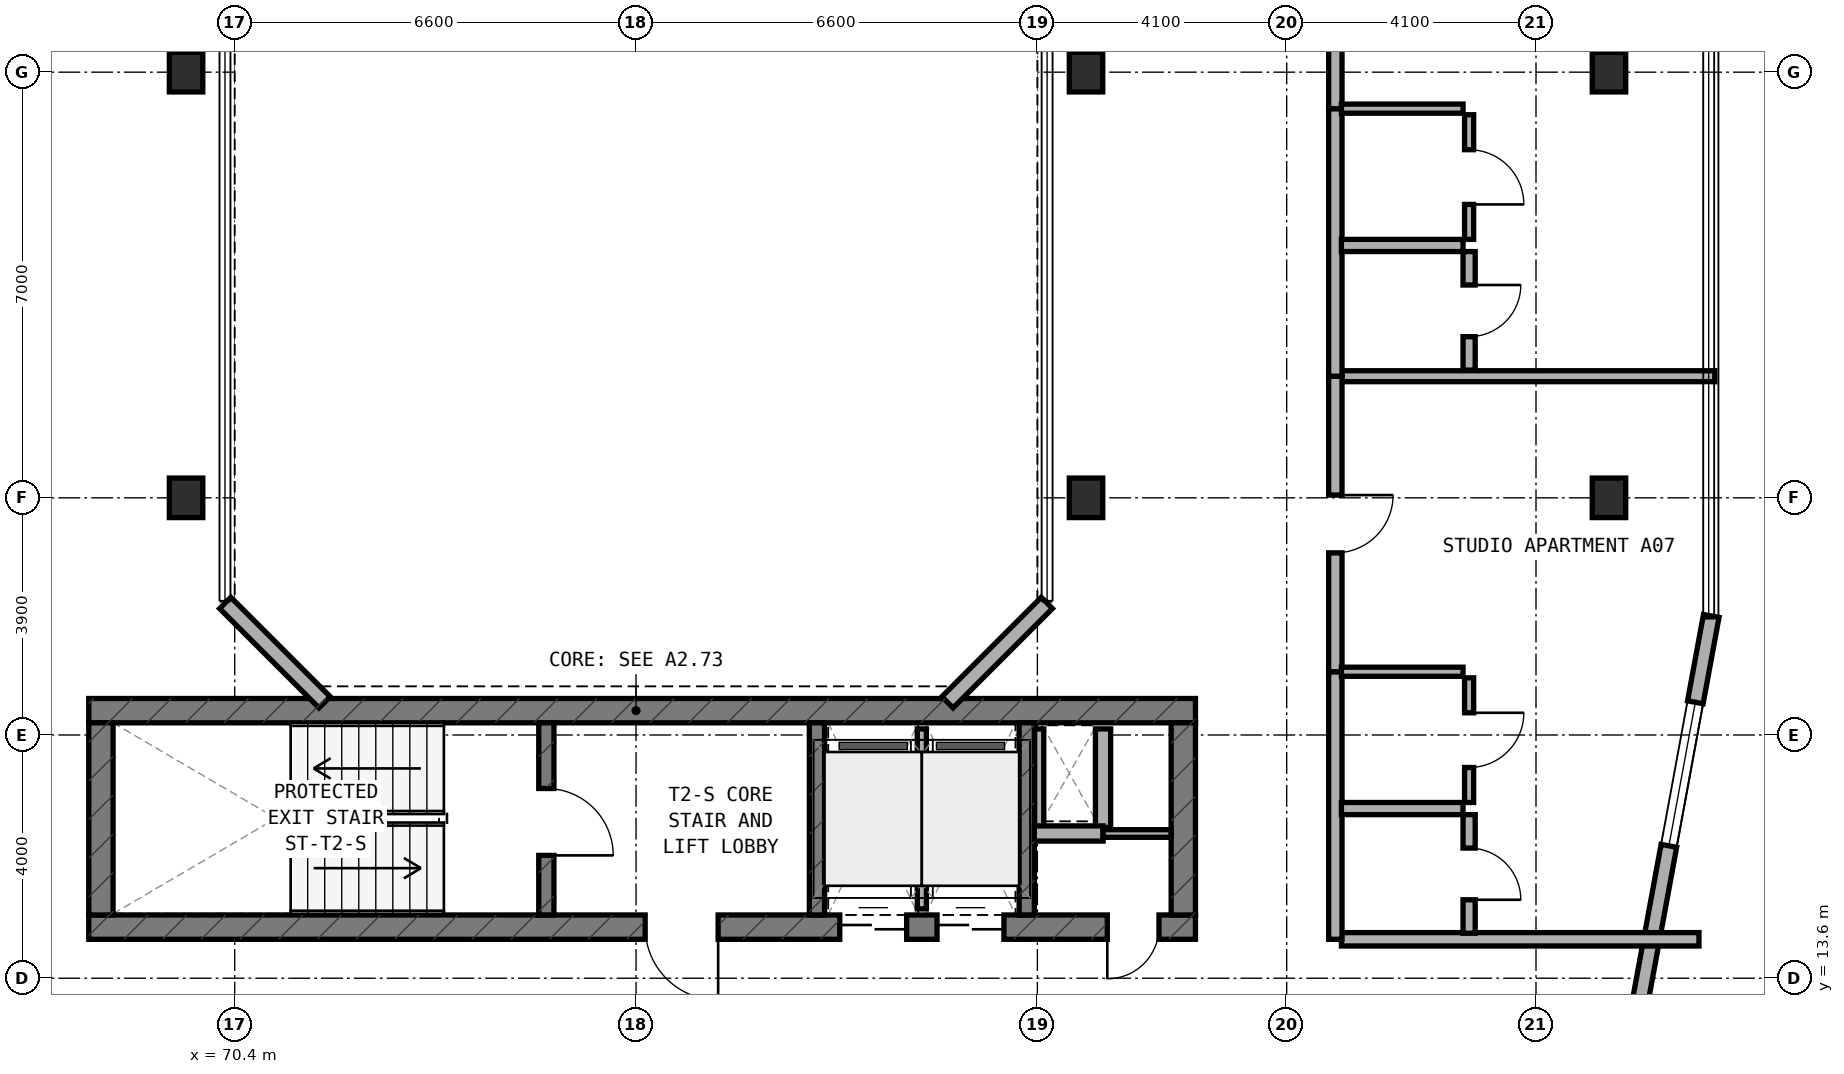
"""IFC4 building model, lengths in metres.
Left out: names, types, materials, properties, quantities, classifications, styles, units other than length and angle.
Written with IfcOpenShell. Run it as: python <this file> out.ifc"""

import sys

from ifc_helpers import new_model, si_unit, direction, frame, frame_2d, origin, origin_2d, place, context, subcontext, project, spatial, rectangle, extrude, element, fill, save


model = new_model("IFC4")
c1 = context("Model", 3, precision=1e-05, world=origin(), true_north=direction((0.0, 1.0)))
c2 = subcontext(c1, "Body", "Model", "MODEL_VIEW")
j1 = project(units=[si_unit("LENGTHUNIT", "METRE"), si_unit("PLANEANGLEUNIT", "RADIAN")], contexts=[c1])
p1 = place(None, origin())
s1 = spatial("IfcSite", under=j1, at=p1, CompositionType="ELEMENT")
p2 = place(p1, origin())
s2 = spatial("IfcBuilding", under=s1, at=p2, CompositionType="ELEMENT")
p3 = place(p2, frame((0.0, 0.0, 116.0)))
s3 = spatial("IfcBuildingStorey", under=s2, at=p3, CompositionType="ELEMENT", Elevation=116.0)
p4 = place(p3, frame((68.0, 14.44, 0.0), z_axis=(0.0, 0.0, 1.0), x_axis=(1.0, 0.0, 0.0)))
e1 = element("IfcWall", 1, at=p4, inside=s3, PredefinedType="SHEAR", context=c2, shape_type="SweptSolid", body=[
    extrude(rectangle(XDim=18.2, YDim=0.4, at=frame_2d((9.1, 0.0))), origin(), (0.0, 0.0, 1.0), 3.5),
])
p5 = place(p4, frame((9.15, 0.0, 0.0)))
e2 = element("IfcOpeningElement", 2, at=p5, cuts=e1, PredefinedType="OPENING", context=c2, shape_type="SweptSolid", body=[
    extrude(rectangle(XDim=1.2, YDim=2.15, at=frame_2d((0.6, 1.075))), frame((0.0, 0.21, 0.0), z_axis=(0.0, -1.0, 0.0), x_axis=(1.0, 0.0, 0.0)), (0.0, 0.0, 1.0), 0.42),
])
p6 = place(p4, frame((16.75, 0.0, 0.0)))
e3 = element("IfcOpeningElement", 3, at=p6, cuts=e1, PredefinedType="OPENING", context=c2, shape_type="SweptSolid", body=[
    extrude(rectangle(XDim=0.85, YDim=2.1, at=frame_2d((0.425, 1.05))), frame((0.0, 0.21, 0.0), z_axis=(0.0, -1.0, 0.0), x_axis=(1.0, 0.0, 0.0)), (0.0, 0.0, 1.0), 0.42),
])
p7 = place(p4, frame((12.35, 0.0, 0.0)))
e4 = element("IfcOpeningElement", 4, at=p7, cuts=e1, PredefinedType="OPENING", context=c2, shape_type="SweptSolid", body=[
    extrude(rectangle(XDim=1.1, YDim=2.15, at=frame_2d((0.55, 1.075))), frame((0.0, 0.21, 0.0), z_axis=(0.0, -1.0, 0.0), x_axis=(1.0, 0.0, 0.0)), (0.0, 0.0, 1.0), 0.42),
])
p8 = place(p4, frame((13.95, 0.0, 0.0)))
e5 = element("IfcOpeningElement", 5, at=p8, cuts=e1, PredefinedType="OPENING", context=c2, shape_type="SweptSolid", body=[
    extrude(rectangle(XDim=1.1, YDim=2.15, at=frame_2d((0.55, 1.075))), frame((0.0, 0.21, 0.0), z_axis=(0.0, -1.0, 0.0), x_axis=(1.0, 0.0, 0.0)), (0.0, 0.0, 1.0), 0.42),
])
p9 = place(p3, frame((68.0, 18.0, 0.0), z_axis=(0.0, 0.0, 1.0), x_axis=(1.0, 0.0, 0.0)))
e6 = element("IfcWall", 6, at=p9, inside=s3, PredefinedType="SHEAR", context=c2, shape_type="SweptSolid", body=[
    extrude(rectangle(XDim=18.2, YDim=0.4, at=frame_2d((9.1, 0.0))), origin(), (0.0, 0.0, 1.0), 3.5),
])
for number, where, z_axis, x_axis in (
    (7, (68.2, 14.64, 0.0), (0.0, 0.0, 1.0), (0.0, 1.0, 0.0)),
    (8, (86.0, 14.64, 0.0), (0.0, 0.0, 1.0), (0.0, 1.0, 0.0)),
):
    element("IfcWall", number, at=place(p3, frame(where, z_axis=z_axis, x_axis=x_axis)), inside=s3, PredefinedType="SHEAR", context=c2, shape_type="SweptSolid", body=[
        extrude(rectangle(XDim=3.16, YDim=0.4, at=frame_2d((1.58, 0.0))), origin(), (0.0, 0.0, 1.0), 3.5),
    ])
p10 = place(p3, frame((75.525, 14.64, 0.0), z_axis=(0.0, 0.0, 1.0), x_axis=(0.0, 1.0, 0.0)))
e9 = element("IfcWall", 9, at=p10, inside=s3, PredefinedType="STANDARD", context=c2, shape_type="SweptSolid", body=[
    extrude(rectangle(XDim=3.16, YDim=0.25, at=frame_2d((1.58, 0.0))), origin(), (0.0, 0.0, 1.0), 3.18),
])
p11 = place(p10, frame((0.98, 0.0, 0.0)))
e10 = element("IfcOpeningElement", 10, at=p11, cuts=e9, PredefinedType="OPENING", context=c2, shape_type="SweptSolid", body=[
    extrude(rectangle(XDim=1.1, YDim=2.15, at=frame_2d((0.55, 1.075))), frame((0.0, 0.135, 0.0), z_axis=(0.0, -1.0, 0.0), x_axis=(1.0, 0.0, 0.0)), (0.0, 0.0, 1.0), 0.27),
])
for number, where, z_axis, x_axis in (
    (11, (79.975, 14.64, 0.0), (0.0, 0.0, 1.0), (0.0, 1.0, 0.0)),
    (12, (83.425, 14.64, 0.0), (0.0, 0.0, 1.0), (0.0, 1.0, 0.0)),
):
    element("IfcWall", number, at=place(p3, frame(where, z_axis=z_axis, x_axis=x_axis)), inside=s3, PredefinedType="STANDARD", context=c2, shape_type="SweptSolid", body=[
        extrude(rectangle(XDim=3.16, YDim=0.25, at=frame_2d((1.58, 0.0))), origin(), (0.0, 0.0, 1.0), 3.18),
    ])
for number, where, z_axis, x_axis in (
    (13, (93.0, 21.5, 0.0), (0.0, 0.0, 1.0), (1.0, 0.0, 0.0)),
    (14, (93.0, 28.5, 0.0), (0.0, 0.0, 1.0), (1.0, 0.0, 0.0)),
    (15, (69.6, 21.5, 0.0), (0.0, 0.0, 1.0), (1.0, 0.0, 0.0)),
    (16, (69.6, 28.5, 0.0), (0.0, 0.0, 1.0), (1.0, 0.0, 0.0)),
    (17, (84.4, 21.5, 0.0), (0.0, 0.0, 1.0), (1.0, 0.0, 0.0)),
    (18, (84.4, 28.5, 0.0), (0.0, 0.0, 1.0), (1.0, 0.0, 0.0)),
):
    element("IfcColumn", number, at=place(p3, frame(where, z_axis=z_axis, x_axis=x_axis)), inside=s3, PredefinedType="COLUMN", context=c2, shape_type="SweptSolid", body=[
        extrude(rectangle(XDim=0.55, YDim=0.65, at=origin_2d()), origin(), (0.0, 0.0, 1.0), 3.5),
    ])
p12 = place(p3, frame((93.071, 10.816, 0.0), z_axis=(0.0, 0.0, 1.0), x_axis=(0.181209963057, 0.983444431215, 0.0)))
e19 = element("IfcWall", 19, at=p12, inside=s3, PredefinedType="STANDARD", context=c2, shape_type="SweptSolid", body=[
    extrude(rectangle(XDim=8.889, YDim=0.26, at=frame_2d((4.445, 0.0))), origin(), (0.0, 0.0, 1.0), 3.18),
])
p13 = place(p12, frame((5.045, 0.0, 0.8)))
e20 = element("IfcOpeningElement", 20, at=p13, cuts=e19, PredefinedType="OPENING", context=c2, shape_type="SweptSolid", body=[
    extrude(rectangle(XDim=2.4, YDim=1.6, at=frame_2d((1.2, 0.8))), frame((0.0, 0.14, 0.0), z_axis=(0.0, -1.0, 0.0), x_axis=(1.0, 0.0, 0.0)), (0.0, 0.0, 1.0), 0.28),
])
for number, where, z_axis, x_axis in (
    (21, (82.122, 18.138, 0.0), (0.0, 0.0, 1.0), (0.707, 0.707, 0.0)),
    (22, (70.244, 19.772, 0.0), (0.0, 0.0, 1.0), (0.707, -0.707, 0.0)),
):
    element("IfcWall", number, at=place(p3, frame(where, z_axis=z_axis, x_axis=x_axis)), inside=s3, PredefinedType="STANDARD", context=c2, shape_type="SweptSolid", body=[
        extrude(rectangle(XDim=2.311, YDim=0.26, at=frame_2d((1.155, 0.0))), origin(), (0.0, 0.0, 1.0), 3.18),
    ])
p14 = place(p3, frame((83.63, 16.08, 0.0), z_axis=(0.0, 0.0, 1.0), x_axis=(0.0, 1.0, 0.0)))
e23 = element("IfcWall", 23, at=p14, inside=s3, PredefinedType="PARTITIONING", context=c2, shape_type="SweptSolid", body=[
    extrude(rectangle(XDim=1.62, YDim=0.15, at=frame_2d((0.81, 0.0))), origin(), (0.0, 0.0, 1.0), 2.755),
])
p15 = place(p3, frame((84.68, 16.08, 0.0), z_axis=(0.0, 0.0, 1.0), x_axis=(0.0, 1.0, 0.0)))
e24 = element("IfcWall", 24, at=p15, inside=s3, PredefinedType="SOLIDWALL", context=c2, shape_type="SweptSolid", body=[
    extrude(rectangle(XDim=1.62, YDim=0.25, at=frame_2d((0.81, 0.0))), origin(), (0.0, 0.0, 1.0), 3.18),
])
p16 = place(p3, frame((83.55, 15.98, 0.0), z_axis=(0.0, 0.0, 1.0), x_axis=(1.0, 0.0, 0.0)))
e25 = element("IfcWall", 25, at=p16, inside=s3, PredefinedType="SOLIDWALL", context=c2, shape_type="SweptSolid", body=[
    extrude(rectangle(XDim=1.13, YDim=0.25, at=frame_2d((0.565, 0.0))), origin(), (0.0, 0.0, 1.0), 3.18),
])
p17 = place(p3, frame((84.68, 15.98, 0.0), z_axis=(0.0, 0.0, 1.0), x_axis=(1.0, 0.0, 0.0)))
e26 = element("IfcWall", 26, at=p17, inside=s3, PredefinedType="PARTITIONING", context=c2, shape_type="SweptSolid", body=[
    extrude(rectangle(XDim=1.12, YDim=0.125, at=frame_2d((0.56, 0.0))), origin(), (0.0, 0.0, 1.0), 3.18),
])
p18 = place(p3, frame((81.7, 14.74, 0.0), z_axis=(0.0, 0.0, 1.0), x_axis=(0.0, 1.0, 0.0)))
e27 = element("IfcWall", 27, at=p18, inside=s3, PredefinedType="PARTITIONING", context=c2, shape_type="SweptSolid", body=[
    extrude(rectangle(XDim=2.96, YDim=0.15, at=frame_2d((1.48, 0.0))), origin(), (0.0, 0.0, 1.0), 3.18),
])
p19 = place(p3, frame((88.6, 14.24, 0.0), z_axis=(0.0, 0.0, 1.0), x_axis=(1.0, 0.0, 0.0)))
e28 = element("IfcWall", 28, at=p19, inside=s3, PredefinedType="SOLIDWALL", context=c2, shape_type="SweptSolid", body=[
    extrude(rectangle(XDim=5.88, YDim=0.22, at=frame_2d((2.94, 0.0))), origin(), (0.0, 0.0, 1.0), 2.875),
])
p20 = place(p3, frame((88.5, 23.5, 0.0), z_axis=(0.0, 0.0, 1.0), x_axis=(1.0, 0.0, 0.0)))
e29 = element("IfcWall", 29, at=p20, inside=s3, PredefinedType="SOLIDWALL", context=c2, shape_type="SweptSolid", body=[
    extrude(rectangle(XDim=6.24, YDim=0.18, at=frame_2d((3.12, 0.0))), origin(), (0.0, 0.0, 1.0), 2.875),
])
p21 = place(p3, frame((88.5, 14.24, 0.0), z_axis=(0.0, 0.0, 1.0), x_axis=(0.0, 1.0, 0.0)))
e30 = element("IfcWall", 30, at=p21, inside=s3, PredefinedType="SOLIDWALL", context=c2, shape_type="SweptSolid", body=[
    extrude(rectangle(XDim=4.4, YDim=0.22, at=frame_2d((2.2, 0.0))), origin(), (0.0, 0.0, 1.0), 3.18),
])
p22 = place(p3, frame((88.5, 18.64, 0.0), z_axis=(0.0, 0.0, 1.0), x_axis=(0.0, 1.0, 0.0)))
e31 = element("IfcWall", 31, at=p22, inside=s3, PredefinedType="SOLIDWALL", context=c2, shape_type="SweptSolid", body=[
    extrude(rectangle(XDim=4.86, YDim=0.22, at=frame_2d((2.43, 0.0))), origin(), (0.0, 0.0, 1.0), 2.755),
])
p23 = place(p22, frame((1.955, 0.0, 0.0)))
e32 = element("IfcOpeningElement", 32, at=p23, cuts=e31, PredefinedType="OPENING", context=c2, shape_type="SweptSolid", body=[
    extrude(rectangle(XDim=0.95, YDim=2.1, at=frame_2d((0.475, 1.05))), frame((0.0, 0.12, 0.0), z_axis=(0.0, -1.0, 0.0), x_axis=(1.0, 0.0, 0.0)), (0.0, 0.0, 1.0), 0.24),
])
p24 = place(p3, frame((88.6, 16.39, 0.0), z_axis=(0.0, 0.0, 1.0), x_axis=(1.0, 0.0, 0.0)))
e33 = element("IfcWall", 33, at=p24, inside=s3, PredefinedType="PLUMBINGWALL", context=c2, shape_type="SweptSolid", body=[
    extrude(rectangle(XDim=2.0, YDim=0.2, at=frame_2d((1.0, 0.0))), origin(), (0.0, 0.0, 1.0), 3.18),
])
p25 = place(p3, frame((88.6, 18.64, 0.0), z_axis=(0.0, 0.0, 1.0), x_axis=(1.0, 0.0, 0.0)))
e34 = element("IfcWall", 34, at=p25, inside=s3, PredefinedType="PARTITIONING", context=c2, shape_type="SweptSolid", body=[
    extrude(rectangle(XDim=2.0, YDim=0.15, at=frame_2d((1.0, 0.0))), origin(), (0.0, 0.0, 1.0), 3.18),
])
p26 = place(p3, frame((90.7, 14.34, 0.0), z_axis=(0.0, 0.0, 1.0), x_axis=(0.0, 1.0, 0.0)))
e35 = element("IfcWall", 35, at=p26, inside=s3, PredefinedType="PLUMBINGWALL", context=c2, shape_type="SweptSolid", body=[
    extrude(rectangle(XDim=1.95, YDim=0.2, at=frame_2d((0.975, 0.0))), origin(), (0.0, 0.0, 1.0), 3.18),
])
p27 = place(p26, frame((0.55, 0.0, 0.0)))
e36 = element("IfcOpeningElement", 36, at=p27, cuts=e35, PredefinedType="OPENING", context=c2, shape_type="SweptSolid", body=[
    extrude(rectangle(XDim=0.85, YDim=2.1, at=frame_2d((0.425, 1.05))), frame((0.0, 0.11, 0.0), z_axis=(0.0, -1.0, 0.0), x_axis=(1.0, 0.0, 0.0)), (0.0, 0.0, 1.0), 0.22),
])
p28 = place(p3, frame((90.7, 16.49, 0.0), z_axis=(0.0, 0.0, 1.0), x_axis=(0.0, 1.0, 0.0)))
e37 = element("IfcWall", 37, at=p28, inside=s3, PredefinedType="PARTITIONING", context=c2, shape_type="SweptSolid", body=[
    extrude(rectangle(XDim=2.05, YDim=0.15, at=frame_2d((1.025, 0.0))), origin(), (0.0, 0.0, 1.0), 3.18),
])
p29 = place(p28, frame((0.575, 0.0, 0.0)))
e38 = element("IfcOpeningElement", 38, at=p29, cuts=e37, PredefinedType="OPENING", context=c2, shape_type="SweptSolid", body=[
    extrude(rectangle(XDim=0.9, YDim=2.1, at=frame_2d((0.45, 1.05))), frame((0.0, 0.085, 0.0), z_axis=(0.0, -1.0, 0.0), x_axis=(1.0, 0.0, 0.0)), (0.0, 0.0, 1.0), 0.17),
])
p30 = place(p3, frame((88.5, 23.5, 0.0), z_axis=(0.0, 0.0, 1.0), x_axis=(0.0, 1.0, 0.0)))
e39 = element("IfcWall", 39, at=p30, inside=s3, PredefinedType="SOLIDWALL", context=c2, shape_type="SweptSolid", body=[
    extrude(rectangle(XDim=4.4, YDim=0.22, at=frame_2d((2.2, 0.0))), origin(), (0.0, 0.0, 1.0), 3.18),
])
p31 = place(p3, frame((88.5, 27.9, 0.0), z_axis=(0.0, 0.0, 1.0), x_axis=(0.0, 1.0, 0.0)))
e40 = element("IfcWall", 40, at=p31, inside=s3, PredefinedType="SOLIDWALL", context=c2, shape_type="SweptSolid", body=[
    extrude(rectangle(XDim=7.86, YDim=0.22, at=frame_2d((3.93, 0.0))), origin(), (0.0, 0.0, 1.0), 2.755),
])
p32 = place(p31, frame((1.555, 0.0, 0.0)))
e41 = element("IfcOpeningElement", 41, at=p32, cuts=e40, PredefinedType="OPENING", context=c2, shape_type="SweptSolid", body=[
    extrude(rectangle(XDim=0.95, YDim=2.1, at=frame_2d((0.475, 1.05))), frame((0.0, 0.12, 0.0), z_axis=(0.0, -1.0, 0.0), x_axis=(1.0, 0.0, 0.0)), (0.0, 0.0, 1.0), 0.24),
])
p33 = place(p3, frame((88.6, 25.65, 0.0), z_axis=(0.0, 0.0, 1.0), x_axis=(1.0, 0.0, 0.0)))
e42 = element("IfcWall", 42, at=p33, inside=s3, PredefinedType="PLUMBINGWALL", context=c2, shape_type="SweptSolid", body=[
    extrude(rectangle(XDim=2.0, YDim=0.2, at=frame_2d((1.0, 0.0))), origin(), (0.0, 0.0, 1.0), 3.18),
])
p34 = place(p3, frame((88.6, 27.9, 0.0), z_axis=(0.0, 0.0, 1.0), x_axis=(1.0, 0.0, 0.0)))
e43 = element("IfcWall", 43, at=p34, inside=s3, PredefinedType="PARTITIONING", context=c2, shape_type="SweptSolid", body=[
    extrude(rectangle(XDim=2.0, YDim=0.15, at=frame_2d((1.0, 0.0))), origin(), (0.0, 0.0, 1.0), 3.18),
])
p35 = place(p3, frame((90.7, 23.6, 0.0), z_axis=(0.0, 0.0, 1.0), x_axis=(0.0, 1.0, 0.0)))
e44 = element("IfcWall", 44, at=p35, inside=s3, PredefinedType="PLUMBINGWALL", context=c2, shape_type="SweptSolid", body=[
    extrude(rectangle(XDim=1.95, YDim=0.2, at=frame_2d((0.975, 0.0))), origin(), (0.0, 0.0, 1.0), 3.18),
])
p36 = place(p35, frame((0.55, 0.0, 0.0)))
e45 = element("IfcOpeningElement", 45, at=p36, cuts=e44, PredefinedType="OPENING", context=c2, shape_type="SweptSolid", body=[
    extrude(rectangle(XDim=0.85, YDim=2.1, at=frame_2d((0.425, 1.05))), frame((0.0, 0.11, 0.0), z_axis=(0.0, -1.0, 0.0), x_axis=(1.0, 0.0, 0.0)), (0.0, 0.0, 1.0), 0.22),
])
p37 = place(p3, frame((90.7, 25.75, 0.0), z_axis=(0.0, 0.0, 1.0), x_axis=(0.0, 1.0, 0.0)))
e46 = element("IfcWall", 46, at=p37, inside=s3, PredefinedType="PARTITIONING", context=c2, shape_type="SweptSolid", body=[
    extrude(rectangle(XDim=2.05, YDim=0.15, at=frame_2d((1.025, 0.0))), origin(), (0.0, 0.0, 1.0), 3.18),
])
p38 = place(p37, frame((0.575, 0.0, 0.0)))
e47 = element("IfcOpeningElement", 47, at=p38, cuts=e46, PredefinedType="OPENING", context=c2, shape_type="SweptSolid", body=[
    extrude(rectangle(XDim=0.9, YDim=2.1, at=frame_2d((0.45, 1.05))), frame((0.0, 0.085, 0.0), z_axis=(0.0, -1.0, 0.0), x_axis=(1.0, 0.0, 0.0)), (0.0, 0.0, 1.0), 0.17),
])
p39 = place(p13, origin())
e48 = element("IfcWindow", 48, at=p39, inside=s3, PartitioningType="SINGLE_PANEL", PredefinedType="WINDOW", context=c2, shape_type="SweptSolid", body=[
    extrude(rectangle(XDim=2.4, YDim=1.6, at=frame_2d((1.2, 0.8))), frame((0.0, 0.03, 0.0), z_axis=(0.0, -1.0, 0.0), x_axis=(1.0, 0.0, 0.0)), (0.0, 0.0, 1.0), 0.06),
])
fill(e20, e48)
p40 = place(p11, frame((1.1, 0.0, 0.0), z_axis=(0.0, 0.0, 1.0), x_axis=(-1.0, 0.0, 0.0)))
e49 = element("IfcDoor", 49, at=p40, inside=s3, OperationType="SINGLE_SWING_RIGHT", PredefinedType="DOOR", context=c2, shape_type="SweptSolid", body=[
    extrude(rectangle(XDim=1.1, YDim=2.15, at=frame_2d((0.55, 1.075))), frame((0.0, 0.025, 0.0), z_axis=(0.0, -1.0, 0.0), x_axis=(1.0, 0.0, 0.0)), (0.0, 0.0, 1.0), 0.05),
])
fill(e10, e49)
p41 = place(p5, frame((1.2, 0.0, 0.0), z_axis=(0.0, 0.0, 1.0), x_axis=(-1.0, 0.0, 0.0)))
e50 = element("IfcDoor", 50, at=p41, inside=s3, OperationType="SINGLE_SWING_LEFT", PredefinedType="DOOR", context=c2, shape_type="SweptSolid", body=[
    extrude(rectangle(XDim=1.2, YDim=2.15, at=frame_2d((0.6, 1.075))), frame((0.0, 0.025, 0.0), z_axis=(0.0, -1.0, 0.0), x_axis=(1.0, 0.0, 0.0)), (0.0, 0.0, 1.0), 0.05),
])
fill(e2, e50)
p42 = place(p6, frame((0.85, 0.0, 0.0), z_axis=(0.0, 0.0, 1.0), x_axis=(-1.0, 0.0, 0.0)))
e51 = element("IfcDoor", 51, at=p42, inside=s3, OperationType="SINGLE_SWING_RIGHT", PredefinedType="DOOR", context=c2, shape_type="SweptSolid", body=[
    extrude(rectangle(XDim=0.85, YDim=2.1, at=frame_2d((0.425, 1.05))), frame((0.0, 0.025, 0.0), z_axis=(0.0, -1.0, 0.0), x_axis=(1.0, 0.0, 0.0)), (0.0, 0.0, 1.0), 0.05),
])
fill(e3, e51)
p43 = place(p7, frame((1.1, 0.0, 0.0), z_axis=(0.0, 0.0, 1.0), x_axis=(-1.0, 0.0, 0.0)))
e52 = element("IfcDoor", 52, at=p43, inside=s3, OperationType="DOUBLE_DOOR_SLIDING", PredefinedType="DOOR", context=c2, shape_type="SweptSolid", body=[
    extrude(rectangle(XDim=1.1, YDim=2.15, at=frame_2d((0.55, 1.075))), frame((0.0, 0.025, 0.0), z_axis=(0.0, -1.0, 0.0), x_axis=(1.0, 0.0, 0.0)), (0.0, 0.0, 1.0), 0.05),
])
fill(e4, e52)
p44 = place(p8, frame((1.1, 0.0, 0.0), z_axis=(0.0, 0.0, 1.0), x_axis=(-1.0, 0.0, 0.0)))
e53 = element("IfcDoor", 53, at=p44, inside=s3, OperationType="DOUBLE_DOOR_SLIDING", PredefinedType="DOOR", context=c2, shape_type="SweptSolid", body=[
    extrude(rectangle(XDim=1.1, YDim=2.15, at=frame_2d((0.55, 1.075))), frame((0.0, 0.025, 0.0), z_axis=(0.0, -1.0, 0.0), x_axis=(1.0, 0.0, 0.0)), (0.0, 0.0, 1.0), 0.05),
])
fill(e5, e53)
p45 = place(p23, frame((0.95, 0.0, 0.0), z_axis=(0.0, 0.0, 1.0), x_axis=(-1.0, 0.0, 0.0)))
e54 = element("IfcDoor", 54, at=p45, inside=s3, OperationType="SINGLE_SWING_LEFT", PredefinedType="DOOR", context=c2, shape_type="SweptSolid", body=[
    extrude(rectangle(XDim=0.95, YDim=2.1, at=frame_2d((0.475, 1.05))), frame((0.0, 0.025, 0.0), z_axis=(0.0, -1.0, 0.0), x_axis=(1.0, 0.0, 0.0)), (0.0, 0.0, 1.0), 0.05),
])
fill(e32, e54)
p46 = place(p27, frame((0.85, 0.0, 0.0), z_axis=(0.0, 0.0, 1.0), x_axis=(-1.0, 0.0, 0.0)))
e55 = element("IfcDoor", 55, at=p46, inside=s3, OperationType="SINGLE_SWING_RIGHT", PredefinedType="DOOR", context=c2, shape_type="SweptSolid", body=[
    extrude(rectangle(XDim=0.85, YDim=2.1, at=frame_2d((0.425, 1.05))), frame((0.0, 0.025, 0.0), z_axis=(0.0, -1.0, 0.0), x_axis=(1.0, 0.0, 0.0)), (0.0, 0.0, 1.0), 0.05),
])
fill(e36, e55)
p47 = place(p29, frame((0.9, 0.0, 0.0), z_axis=(0.0, 0.0, 1.0), x_axis=(-1.0, 0.0, 0.0)))
e56 = element("IfcDoor", 56, at=p47, inside=s3, OperationType="SINGLE_SWING_LEFT", PredefinedType="DOOR", context=c2, shape_type="SweptSolid", body=[
    extrude(rectangle(XDim=0.9, YDim=2.1, at=frame_2d((0.45, 1.05))), frame((0.0, 0.025, 0.0), z_axis=(0.0, -1.0, 0.0), x_axis=(1.0, 0.0, 0.0)), (0.0, 0.0, 1.0), 0.05),
])
fill(e38, e56)
p48 = place(p36, frame((0.85, 0.0, 0.0), z_axis=(0.0, 0.0, 1.0), x_axis=(-1.0, 0.0, 0.0)))
e57 = element("IfcDoor", 57, at=p48, inside=s3, OperationType="SINGLE_SWING_LEFT", PredefinedType="DOOR", context=c2, shape_type="SweptSolid", body=[
    extrude(rectangle(XDim=0.85, YDim=2.1, at=frame_2d((0.425, 1.05))), frame((0.0, 0.025, 0.0), z_axis=(0.0, -1.0, 0.0), x_axis=(1.0, 0.0, 0.0)), (0.0, 0.0, 1.0), 0.05),
])
fill(e45, e57)
p49 = place(p38, frame((0.9, 0.0, 0.0), z_axis=(0.0, 0.0, 1.0), x_axis=(-1.0, 0.0, 0.0)))
e58 = element("IfcDoor", 58, at=p49, inside=s3, OperationType="SINGLE_SWING_RIGHT", PredefinedType="DOOR", context=c2, shape_type="SweptSolid", body=[
    extrude(rectangle(XDim=0.9, YDim=2.1, at=frame_2d((0.45, 1.05))), frame((0.0, 0.025, 0.0), z_axis=(0.0, -1.0, 0.0), x_axis=(1.0, 0.0, 0.0)), (0.0, 0.0, 1.0), 0.05),
])
fill(e47, e58)
save(model, sys.argv[1])
